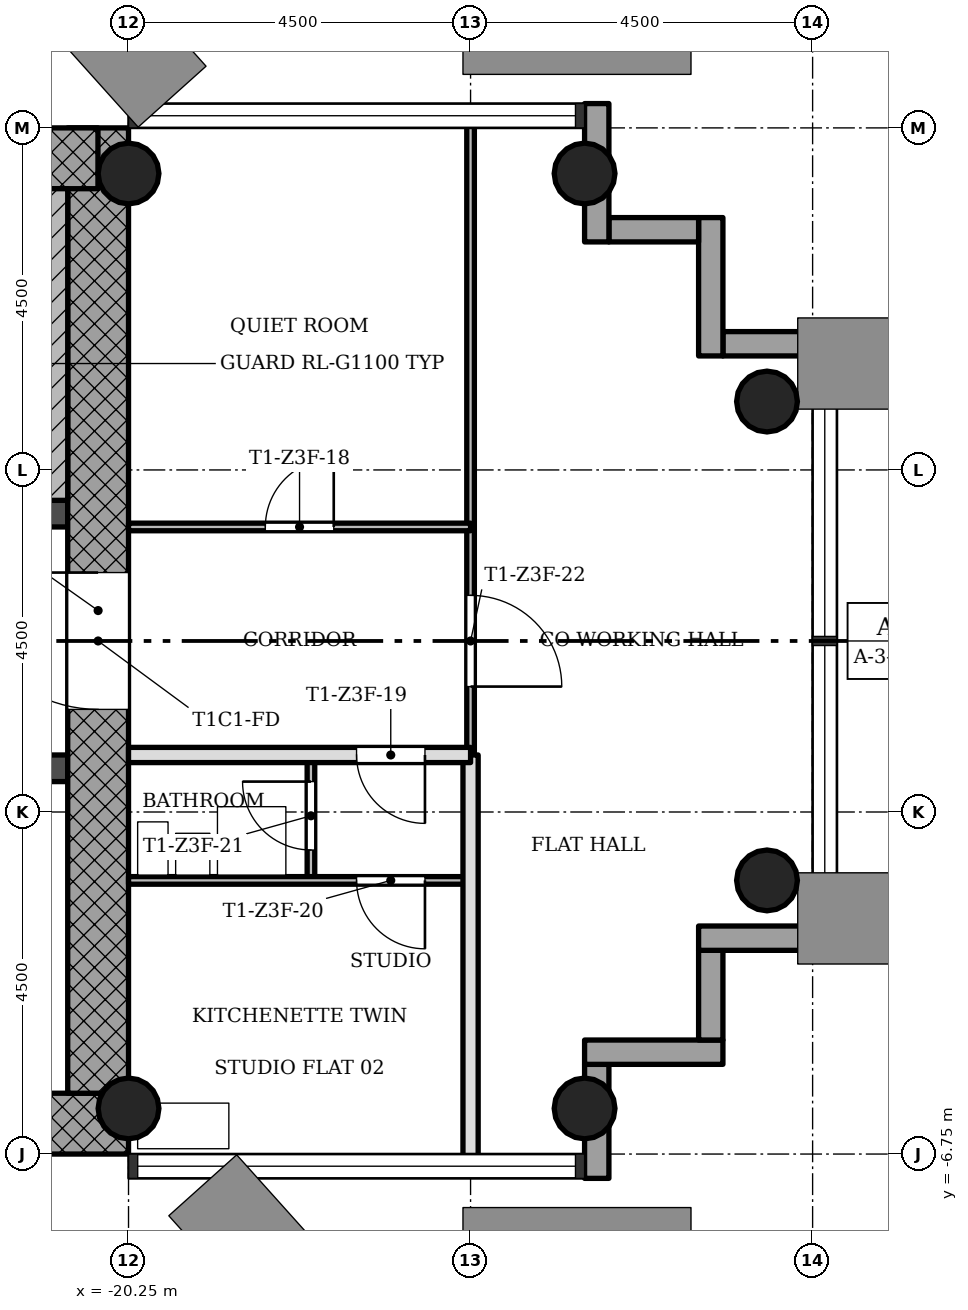
"""IFC4 building model, lengths in metres.
Left out: names, types, materials, properties, quantities, classifications, styles, units other than length and angle.
Written with IfcOpenShell. Run it as: python <this file> out.ifc"""

import sys

from ifc_helpers import new_model, si_unit, direction, frame, frame_2d, origin, origin_2d, place, context, subcontext, project, spatial, rectangle, hollow_circle, extrude, element, fill, save


model = new_model("IFC4")
c1 = context("Model", 3, precision=1e-05, world=origin(), true_north=direction((0.0, 1.0)))
c2 = subcontext(c1, "Body", "Model", "MODEL_VIEW")
j1 = project(units=[si_unit("LENGTHUNIT", "METRE"), si_unit("PLANEANGLEUNIT", "RADIAN")], contexts=[c1])
p1 = place(None, origin())
s1 = spatial("IfcSite", under=j1, at=p1, CompositionType="ELEMENT")
p2 = place(p1, origin())
s2 = spatial("IfcBuilding", under=s1, at=p2, CompositionType="ELEMENT")
p3 = place(p2, frame((0.0, 0.0, 164.3)))
s3 = spatial("IfcBuildingStorey", under=s2, at=p3, CompositionType="ELEMENT", Elevation=164.3)
p4 = place(p3, frame((-28.45, -6.35, 0.0), z_axis=(0.0, 0.0, 1.0), x_axis=(1.0, 0.0, 0.0)))
e1 = element("IfcWall", 1, at=p4, inside=s3, PredefinedType="SHEAR", context=c2, shape_type="SweptSolid", body=[
    extrude(rectangle(XDim=8.2, YDim=0.8, at=frame_2d((4.1, 0.0))), origin(), (0.0, 0.0, 1.0), 3.4),
])
p5 = place(p3, frame((-20.65, -5.95, 0.0), z_axis=(0.0, 0.0, 1.0), x_axis=(0.0, 1.0, 0.0)))
e2 = element("IfcWall", 2, at=p5, inside=s3, PredefinedType="SHEAR", context=c2, shape_type="SweptSolid", body=[
    extrude(rectangle(XDim=12.7, YDim=0.8, at=frame_2d((6.35, 0.0))), origin(), (0.0, 0.0, 1.0), 3.4),
])
p6 = place(p5, frame((5.05, 0.0, 0.0)))
e3 = element("IfcOpeningElement", 3, at=p6, cuts=e2, PredefinedType="OPENING", context=c2, shape_type="SweptSolid", body=[
    extrude(rectangle(XDim=1.8, YDim=2.1, at=frame_2d((0.9, 1.05))), frame((0.0, 0.41, 0.0), z_axis=(0.0, -1.0, 0.0), x_axis=(1.0, 0.0, 0.0)), (0.0, 0.0, 1.0), 0.82),
])
p7 = place(p3, frame((-20.652, 6.35, 0.0), z_axis=(0.0, 0.0, 1.0), x_axis=(-1.0, 0.0, 0.0)))
e4 = element("IfcWall", 4, at=p7, inside=s3, PredefinedType="SHEAR", context=c2, shape_type="SweptSolid", body=[
    extrude(rectangle(XDim=8.796, YDim=0.8, at=frame_2d((4.398, 0.0))), origin(), (0.0, 0.0, 1.0), 3.4),
])
p8 = place(p3, frame((-28.45, -1.675, 0.0), z_axis=(0.0, 0.0, 1.0), x_axis=(1.0, 0.0, 0.0)))
e5 = element("IfcWall", 5, at=p8, inside=s3, PredefinedType="SHEAR", context=c2, shape_type="SweptSolid", body=[
    extrude(rectangle(XDim=7.4, YDim=0.35, at=frame_2d((3.7, 0.0))), origin(), (0.0, 0.0, 1.0), 3.4),
])
p9 = place(p8, frame((0.95, 0.0, 0.0)))
e6 = element("IfcOpeningElement", 6, at=p9, cuts=e5, PredefinedType="OPENING", context=c2, shape_type="SweptSolid", body=[
    extrude(rectangle(XDim=1.1, YDim=2.1, at=frame_2d((0.55, 1.05))), frame((0.0, 0.185, 0.0), z_axis=(0.0, -1.0, 0.0), x_axis=(1.0, 0.0, 0.0)), (0.0, 0.0, 1.0), 0.37),
])
p10 = place(p8, frame((3.15, 0.0, 0.0)))
e7 = element("IfcOpeningElement", 7, at=p10, cuts=e5, PredefinedType="OPENING", context=c2, shape_type="SweptSolid", body=[
    extrude(rectangle(XDim=1.1, YDim=2.1, at=frame_2d((0.55, 1.05))), frame((0.0, 0.185, 0.0), z_axis=(0.0, -1.0, 0.0), x_axis=(1.0, 0.0, 0.0)), (0.0, 0.0, 1.0), 0.37),
])
p11 = place(p8, frame((5.35, 0.0, 0.0)))
e8 = element("IfcOpeningElement", 8, at=p11, cuts=e5, PredefinedType="OPENING", context=c2, shape_type="SweptSolid", body=[
    extrude(rectangle(XDim=1.1, YDim=2.1, at=frame_2d((0.55, 1.05))), frame((0.0, 0.185, 0.0), z_axis=(0.0, -1.0, 0.0), x_axis=(1.0, 0.0, 0.0)), (0.0, 0.0, 1.0), 0.37),
])
p12 = place(p3, frame((-28.45, 1.675, 0.0), z_axis=(0.0, 0.0, 1.0), x_axis=(1.0, 0.0, 0.0)))
e9 = element("IfcWall", 9, at=p12, inside=s3, PredefinedType="SHEAR", context=c2, shape_type="SweptSolid", body=[
    extrude(rectangle(XDim=7.4, YDim=0.35, at=frame_2d((3.7, 0.0))), origin(), (0.0, 0.0, 1.0), 3.4),
])
p13 = place(p12, frame((0.85, 0.0, 0.0)))
e10 = element("IfcOpeningElement", 10, at=p13, cuts=e9, PredefinedType="OPENING", context=c2, shape_type="SweptSolid", body=[
    extrude(rectangle(XDim=0.9, YDim=2.1, at=frame_2d((0.45, 1.05))), frame((0.0, 0.185, 0.0), z_axis=(0.0, -1.0, 0.0), x_axis=(1.0, 0.0, 0.0)), (0.0, 0.0, 1.0), 0.37),
])
for number, where, z_axis, x_axis in (
    (11, (-20.25, -6.15, 0.0), (0.0, 0.0, 1.0), (1.0, 0.0, 0.0)),
    (12, (-20.25, 6.15, 0.0), (0.0, 0.0, 1.0), (1.0, 0.0, 0.0)),
    (13, (-14.25, -6.15, 0.0), (0.0, 0.0, 1.0), (1.0, 0.0, 0.0)),
    (14, (-14.25, 6.15, 0.0), (0.0, 0.0, 1.0), (1.0, 0.0, 0.0)),
    (15, (-11.85, -3.15, 0.0), (0.0, 0.0, 1.0), (1.0, 0.0, 0.0)),
    (16, (-11.85, 3.15, 0.0), (0.0, 0.0, 1.0), (1.0, 0.0, 0.0)),
):
    element("IfcColumn", number, at=place(p3, frame(where, z_axis=z_axis, x_axis=x_axis)), inside=s3, PredefinedType="COLUMN", context=c2, shape_type="SweptSolid", body=[
        extrude(hollow_circle(Radius=0.4, WallThickness=0.028, at=origin_2d()), origin(), (0.0, 0.0, 1.0), 3.4),
    ])
p14 = place(p3, frame((-14.09, -7.07, -0.3), z_axis=(0.0, 0.0, 1.0), x_axis=(0.0, 1.0, 0.0)))
e17 = element("IfcWall", 17, at=p14, inside=s3, PredefinedType="STANDARD", context=c2, shape_type="SweptSolid", body=[
    extrude(rectangle(XDim=1.5, YDim=0.32, at=frame_2d((0.75, 0.0))), origin(), (0.0, 0.0, 1.0), 3.4),
])
p15 = place(p3, frame((-14.25, -5.41, -0.3), z_axis=(0.0, 0.0, 1.0), x_axis=(1.0, 0.0, 0.0)))
e18 = element("IfcWall", 18, at=p15, inside=s3, PredefinedType="STANDARD", context=c2, shape_type="SweptSolid", body=[
    extrude(rectangle(XDim=1.82, YDim=0.32, at=frame_2d((0.91, 0.0))), origin(), (0.0, 0.0, 1.0), 3.4),
])
p16 = place(p3, frame((-12.59, -5.25, -0.3), z_axis=(0.0, 0.0, 1.0), x_axis=(0.0, 1.0, 0.0)))
e19 = element("IfcWall", 19, at=p16, inside=s3, PredefinedType="STANDARD", context=c2, shape_type="SweptSolid", body=[
    extrude(rectangle(XDim=1.18, YDim=0.32, at=frame_2d((0.59, 0.0))), origin(), (0.0, 0.0, 1.0), 3.4),
])
p17 = place(p3, frame((-12.75, -3.91, -0.3), z_axis=(0.0, 0.0, 1.0), x_axis=(1.0, 0.0, 0.0)))
e20 = element("IfcWall", 20, at=p17, inside=s3, PredefinedType="STANDARD", context=c2, shape_type="SweptSolid", body=[
    extrude(rectangle(XDim=1.82, YDim=0.32, at=frame_2d((0.91, 0.0))), origin(), (0.0, 0.0, 1.0), 3.4),
])
p18 = place(p3, frame((-10.93, 3.91, -0.3), z_axis=(0.0, 0.0, 1.0), x_axis=(-1.0, 0.0, 0.0)))
e21 = element("IfcWall", 21, at=p18, inside=s3, PredefinedType="STANDARD", context=c2, shape_type="SweptSolid", body=[
    extrude(rectangle(XDim=1.5, YDim=0.32, at=frame_2d((0.75, 0.0))), origin(), (0.0, 0.0, 1.0), 3.4),
])
p19 = place(p3, frame((-12.59, 3.75, -0.3), z_axis=(0.0, 0.0, 1.0), x_axis=(0.0, 1.0, 0.0)))
e22 = element("IfcWall", 22, at=p19, inside=s3, PredefinedType="STANDARD", context=c2, shape_type="SweptSolid", body=[
    extrude(rectangle(XDim=1.82, YDim=0.32, at=frame_2d((0.91, 0.0))), origin(), (0.0, 0.0, 1.0), 3.4),
])
p20 = place(p3, frame((-12.75, 5.41, -0.3), z_axis=(0.0, 0.0, 1.0), x_axis=(-1.0, 0.0, 0.0)))
e23 = element("IfcWall", 23, at=p20, inside=s3, PredefinedType="STANDARD", context=c2, shape_type="SweptSolid", body=[
    extrude(rectangle(XDim=1.18, YDim=0.32, at=frame_2d((0.59, 0.0))), origin(), (0.0, 0.0, 1.0), 3.4),
])
p21 = place(p3, frame((-14.09, 5.25, -0.3), z_axis=(0.0, 0.0, 1.0), x_axis=(0.0, 1.0, 0.0)))
e24 = element("IfcWall", 24, at=p21, inside=s3, PredefinedType="STANDARD", context=c2, shape_type="SweptSolid", body=[
    extrude(rectangle(XDim=1.82, YDim=0.32, at=frame_2d((0.91, 0.0))), origin(), (0.0, 0.0, 1.0), 3.4),
])
p22 = place(p3, frame((-17.85, -3.15, 0.0), z_axis=(0.0, 0.0, 1.0), x_axis=(0.0, 1.0, 0.0)))
e25 = element("IfcWall", 25, at=p22, inside=s3, PredefinedType="PARTITIONING", context=c2, shape_type="SweptSolid", body=[
    extrude(rectangle(XDim=1.65, YDim=0.1, at=frame_2d((0.825, 0.0))), origin(), (0.0, 0.0, 1.0), 3.0),
])
p23 = place(p22, frame((0.4, 0.0, 0.0)))
e26 = element("IfcOpeningElement", 26, at=p23, cuts=e25, PredefinedType="OPENING", context=c2, shape_type="SweptSolid", body=[
    extrude(rectangle(XDim=0.9, YDim=2.1, at=frame_2d((0.45, 1.05))), frame((0.0, 0.06, 0.0), z_axis=(0.0, -1.0, 0.0), x_axis=(1.0, 0.0, 0.0)), (0.0, 0.0, 1.0), 0.12),
])
p24 = place(p3, frame((-15.75, -1.5, 0.0), z_axis=(0.0, 0.0, 1.0), x_axis=(0.0, 1.0, 0.0)))
e27 = element("IfcWall", 27, at=p24, inside=s3, PredefinedType="PARTITIONING", context=c2, shape_type="SweptSolid", body=[
    extrude(rectangle(XDim=8.35, YDim=0.1, at=frame_2d((4.175, 0.0))), origin(), (0.0, 0.0, 1.0), 3.0),
])
p25 = place(p24, frame((0.9, 0.0, 0.0)))
e28 = element("IfcOpeningElement", 28, at=p25, cuts=e27, PredefinedType="OPENING", context=c2, shape_type="SweptSolid", body=[
    extrude(rectangle(XDim=1.2, YDim=2.1, at=frame_2d((0.6, 1.05))), frame((0.0, 0.06, 0.0), z_axis=(0.0, -1.0, 0.0), x_axis=(1.0, 0.0, 0.0)), (0.0, 0.0, 1.0), 0.12),
])
p26 = place(p3, frame((-15.75, -6.85, 0.0), z_axis=(0.0, 0.0, 1.0), x_axis=(0.0, 1.0, 0.0)))
e29 = element("IfcWall", 29, at=p26, inside=s3, PredefinedType="SOLIDWALL", context=c2, shape_type="SweptSolid", body=[
    extrude(rectangle(XDim=5.35, YDim=0.2, at=frame_2d((2.675, 0.0))), origin(), (0.0, 0.0, 1.0), 3.0),
])
p27 = place(p3, frame((-20.25, -3.15, 0.0), z_axis=(0.0, 0.0, 1.0), x_axis=(1.0, 0.0, 0.0)))
e30 = element("IfcWall", 30, at=p27, inside=s3, PredefinedType="PARTITIONING", context=c2, shape_type="SweptSolid", body=[
    extrude(rectangle(XDim=4.5, YDim=0.1, at=frame_2d((2.25, 0.0))), origin(), (0.0, 0.0, 1.0), 3.0),
])
p28 = place(p27, frame((3.0, 0.0, 0.0)))
e31 = element("IfcOpeningElement", 31, at=p28, cuts=e30, PredefinedType="OPENING", context=c2, shape_type="SweptSolid", body=[
    extrude(rectangle(XDim=0.9, YDim=2.1, at=frame_2d((0.45, 1.05))), frame((0.0, 0.06, 0.0), z_axis=(0.0, -1.0, 0.0), x_axis=(1.0, 0.0, 0.0)), (0.0, 0.0, 1.0), 0.12),
])
p29 = place(p3, frame((-20.25, -1.5, 0.0), z_axis=(0.0, 0.0, 1.0), x_axis=(1.0, 0.0, 0.0)))
e32 = element("IfcWall", 32, at=p29, inside=s3, PredefinedType="SOLIDWALL", context=c2, shape_type="SweptSolid", body=[
    extrude(rectangle(XDim=4.5, YDim=0.2, at=frame_2d((2.25, 0.0))), origin(), (0.0, 0.0, 1.0), 3.0),
])
p30 = place(p29, frame((3.0, 0.0, 0.0)))
e33 = element("IfcOpeningElement", 33, at=p30, cuts=e32, PredefinedType="OPENING", context=c2, shape_type="SweptSolid", body=[
    extrude(rectangle(XDim=0.9, YDim=2.1, at=frame_2d((0.45, 1.05))), frame((0.0, 0.11, 0.0), z_axis=(0.0, -1.0, 0.0), x_axis=(1.0, 0.0, 0.0)), (0.0, 0.0, 1.0), 0.22),
])
p31 = place(p3, frame((-20.25, 1.5, 0.0), z_axis=(0.0, 0.0, 1.0), x_axis=(1.0, 0.0, 0.0)))
e34 = element("IfcWall", 34, at=p31, inside=s3, PredefinedType="PARTITIONING", context=c2, shape_type="SweptSolid", body=[
    extrude(rectangle(XDim=4.5, YDim=0.1, at=frame_2d((2.25, 0.0))), origin(), (0.0, 0.0, 1.0), 3.0),
])
p32 = place(p31, frame((1.8, 0.0, 0.0)))
e35 = element("IfcOpeningElement", 35, at=p32, cuts=e34, PredefinedType="OPENING", context=c2, shape_type="SweptSolid", body=[
    extrude(rectangle(XDim=0.9, YDim=2.1, at=frame_2d((0.45, 1.05))), frame((0.0, 0.06, 0.0), z_axis=(0.0, -1.0, 0.0), x_axis=(1.0, 0.0, 0.0)), (0.0, 0.0, 1.0), 0.12),
])
p33 = place(p3, frame((-21.25, 1.85, 0.0), z_axis=(0.0, 0.0, 1.0), x_axis=(0.0, 1.0, 0.0)))
e36 = element("IfcWall", 36, at=p33, inside=s3, PredefinedType="SHEAR", context=c2, shape_type="SweptSolid", body=[
    extrude(rectangle(XDim=4.1, YDim=0.4, at=frame_2d((2.05, 0.0))), origin(), (0.0, 0.0, 1.0), 3.4),
])
p34 = place(p32, origin())
e37 = element("IfcDoor", 37, at=p34, inside=s3, OperationType="SINGLE_SWING_LEFT", PredefinedType="DOOR", context=c2, shape_type="SweptSolid", body=[
    extrude(rectangle(XDim=0.9, YDim=2.1, at=frame_2d((0.45, 1.05))), frame((0.0, 0.025, 0.0), z_axis=(0.0, -1.0, 0.0), x_axis=(1.0, 0.0, 0.0)), (0.0, 0.0, 1.0), 0.05),
])
fill(e35, e37)
p35 = place(p30, origin())
e38 = element("IfcDoor", 38, at=p35, inside=s3, OperationType="SINGLE_SWING_RIGHT", PredefinedType="DOOR", context=c2, shape_type="SweptSolid", body=[
    extrude(rectangle(XDim=0.9, YDim=2.1, at=frame_2d((0.45, 1.05))), frame((0.0, 0.025, 0.0), z_axis=(0.0, -1.0, 0.0), x_axis=(1.0, 0.0, 0.0)), (0.0, 0.0, 1.0), 0.05),
])
fill(e33, e38)
p36 = place(p28, origin())
e39 = element("IfcDoor", 39, at=p36, inside=s3, OperationType="SINGLE_SWING_RIGHT", PredefinedType="DOOR", context=c2, shape_type="SweptSolid", body=[
    extrude(rectangle(XDim=0.9, YDim=2.1, at=frame_2d((0.45, 1.05))), frame((0.0, 0.025, 0.0), z_axis=(0.0, -1.0, 0.0), x_axis=(1.0, 0.0, 0.0)), (0.0, 0.0, 1.0), 0.05),
])
fill(e31, e39)
p37 = place(p23, origin())
e40 = element("IfcDoor", 40, at=p37, inside=s3, OperationType="SINGLE_SWING_LEFT", PredefinedType="DOOR", context=c2, shape_type="SweptSolid", body=[
    extrude(rectangle(XDim=0.9, YDim=2.1, at=frame_2d((0.45, 1.05))), frame((0.0, 0.025, 0.0), z_axis=(0.0, -1.0, 0.0), x_axis=(1.0, 0.0, 0.0)), (0.0, 0.0, 1.0), 0.05),
])
fill(e26, e40)
p38 = place(p25, origin())
e41 = element("IfcDoor", 41, at=p38, inside=s3, OperationType="SINGLE_SWING_LEFT", PredefinedType="DOOR", context=c2, shape_type="SweptSolid", body=[
    extrude(rectangle(XDim=1.2, YDim=2.1, at=frame_2d((0.6, 1.05))), frame((0.0, 0.025, 0.0), z_axis=(0.0, -1.0, 0.0), x_axis=(1.0, 0.0, 0.0)), (0.0, 0.0, 1.0), 0.05),
])
fill(e28, e41)
p39 = place(p6, origin())
e42 = element("IfcDoor", 42, at=p39, inside=s3, OperationType="SINGLE_SWING_LEFT", PredefinedType="DOOR", context=c2, shape_type="SweptSolid", body=[
    extrude(rectangle(XDim=1.8, YDim=2.1, at=frame_2d((0.9, 1.05))), frame((0.0, 0.025, 0.0), z_axis=(0.0, -1.0, 0.0), x_axis=(1.0, 0.0, 0.0)), (0.0, 0.0, 1.0), 0.05),
])
fill(e3, e42)
save(model, sys.argv[1])
